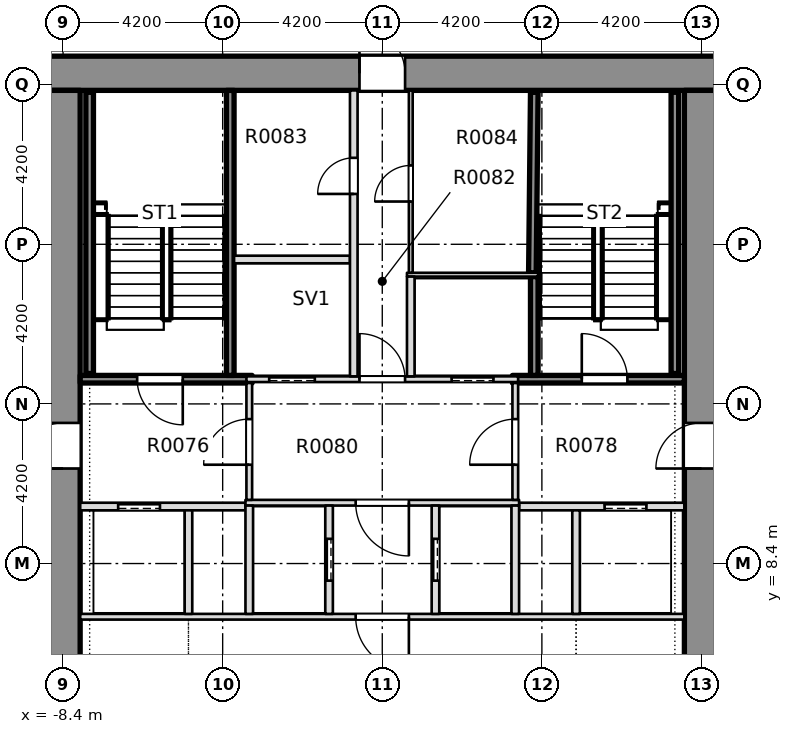
"""IFC4 building model, lengths in metres.
Left out: names, types, materials, properties, quantities, classifications, styles, units other than length and angle.
Written with IfcOpenShell. Run it as: python <this file> out.ifc"""

import sys

from ifc_helpers import new_model, si_unit, direction, frame, frame_2d, origin, place, context, subcontext, project, spatial, rectangle, extrude, element, fill, save


model = new_model("IFC4")
c1 = context("Model", 3, precision=1e-05, world=origin(), true_north=direction((0.0, 1.0)))
c2 = subcontext(c1, "Body", "Model", "MODEL_VIEW")
j1 = project(units=[si_unit("LENGTHUNIT", "METRE"), si_unit("PLANEANGLEUNIT", "RADIAN")], contexts=[c1])
p1 = place(None, origin())
s1 = spatial("IfcSite", under=j1, at=p1, CompositionType="ELEMENT")
p2 = place(p1, origin())
s2 = spatial("IfcBuilding", under=s1, at=p2, CompositionType="ELEMENT")
p3 = place(p2, origin())
s3 = spatial("IfcBuildingStorey", under=s2, at=p3, CompositionType="ELEMENT", Elevation=0.0)
p4 = place(p3, frame((-11.7, 21.3, -0.45), z_axis=(0.0, 0.0, 1.0), x_axis=(1.0, 0.0, 0.0)))
e1 = element("IfcWall", 1, at=p4, inside=s3, PredefinedType="SOLIDWALL", context=c2, shape_type="SweptSolid", body=[
    extrude(rectangle(XDim=23.4, YDim=0.9, at=frame_2d((11.7, 0.0))), origin(), (0.0, 0.0, 1.0), 7.55),
])
p5 = place(p4, frame((11.1, 0.0, 0.45)))
e2 = element("IfcOpeningElement", 2, at=p5, cuts=e1, PredefinedType="OPENING", context=c2, shape_type="SweptSolid", body=[
    extrude(rectangle(XDim=1.2, YDim=2.1, at=frame_2d((0.6, 1.05))), frame((0.0, 0.46, 0.0), z_axis=(0.0, -1.0, 0.0), x_axis=(1.0, 0.0, 0.0)), (0.0, 0.0, 1.0), 0.92),
])
p6 = place(p3, frame((-8.4, -7.5, -0.45), z_axis=(0.0, 0.0, 1.0), x_axis=(0.0, 1.0, 0.0)))
e3 = element("IfcWall", 3, at=p6, inside=s3, PredefinedType="SHEAR", context=c2, shape_type="SweptSolid", body=[
    extrude(rectangle(XDim=28.35, YDim=0.9, at=frame_2d((14.175, 0.0))), origin(), (0.0, 0.0, 1.0), 7.55),
])
p7 = place(p6, frame((18.4, 0.0, 0.45)))
e4 = element("IfcOpeningElement", 4, at=p7, cuts=e3, PredefinedType="OPENING", context=c2, shape_type="SweptSolid", body=[
    extrude(rectangle(XDim=1.2, YDim=2.1, at=frame_2d((0.6, 1.05))), frame((0.0, 0.46, 0.0), z_axis=(0.0, -1.0, 0.0), x_axis=(1.0, 0.0, 0.0)), (0.0, 0.0, 1.0), 0.92),
])
p8 = place(p3, frame((8.4, -7.5, -0.45), z_axis=(0.0, 0.0, 1.0), x_axis=(0.0, 1.0, 0.0)))
e5 = element("IfcWall", 5, at=p8, inside=s3, PredefinedType="SHEAR", context=c2, shape_type="SweptSolid", body=[
    extrude(rectangle(XDim=28.35, YDim=0.9, at=frame_2d((14.175, 0.0))), origin(), (0.0, 0.0, 1.0), 7.55),
])
p9 = place(p8, frame((18.4, 0.0, 0.45)))
e6 = element("IfcOpeningElement", 6, at=p9, cuts=e5, PredefinedType="OPENING", context=c2, shape_type="SweptSolid", body=[
    extrude(rectangle(XDim=1.2, YDim=2.1, at=frame_2d((0.6, 1.05))), frame((0.0, 0.46, 0.0), z_axis=(0.0, -1.0, 0.0), x_axis=(1.0, 0.0, 0.0)), (0.0, 0.0, 1.0), 0.92),
])
p10 = place(p3, frame((-7.949, 7.0, 0.0), z_axis=(0.0, 0.0, 1.0), x_axis=(1.0, 0.0, 0.0)))
e7 = element("IfcWall", 7, at=p10, inside=s3, PredefinedType="PARTITIONING", context=c2, shape_type="SweptSolid", body=[
    extrude(rectangle(XDim=15.898, YDim=0.15, at=frame_2d((7.949, 0.0))), origin(), (0.0, 0.0, 1.0), 7.1),
])
p11 = place(p10, frame((7.249, 0.0, 0.0)))
e8 = element("IfcOpeningElement", 8, at=p11, cuts=e7, PredefinedType="OPENING", context=c2, shape_type="SweptSolid", body=[
    extrude(rectangle(XDim=1.4, YDim=2.1, at=frame_2d((0.7, 1.05))), frame((0.0, 0.085, 0.0), z_axis=(0.0, -1.0, 0.0), x_axis=(1.0, 0.0, 0.0)), (0.0, 0.0, 1.0), 0.17),
])
p12 = place(p3, frame((-7.949, 9.9, 0.0), z_axis=(0.0, 0.0, 1.0), x_axis=(1.0, 0.0, 0.0)))
e9 = element("IfcWall", 9, at=p12, inside=s3, PredefinedType="PARTITIONING", context=c2, shape_type="SweptSolid", body=[
    extrude(rectangle(XDim=4.349, YDim=0.2, at=frame_2d((2.174, 0.0))), origin(), (0.0, 0.0, 1.0), 7.1),
])
p13 = place(p12, frame((0.999, 0.0, 0.0)))
e10 = element("IfcOpeningElement", 10, at=p13, cuts=e9, PredefinedType="OPENING", context=c2, shape_type="SweptSolid", body=[
    extrude(rectangle(XDim=1.1, YDim=2.1, at=frame_2d((0.55, 1.05))), frame((0.0, 0.11, 0.0), z_axis=(0.0, -1.0, 0.0), x_axis=(1.0, 0.0, 0.0)), (0.0, 0.0, 1.0), 0.22),
])
p14 = place(p3, frame((3.6, 9.9, 0.0), z_axis=(0.0, 0.0, 1.0), x_axis=(1.0, 0.0, 0.0)))
e11 = element("IfcWall", 11, at=p14, inside=s3, PredefinedType="PARTITIONING", context=c2, shape_type="SweptSolid", body=[
    extrude(rectangle(XDim=4.349, YDim=0.2, at=frame_2d((2.174, 0.0))), origin(), (0.0, 0.0, 1.0), 7.1),
])
p15 = place(p14, frame((2.25, 0.0, 0.0)))
e12 = element("IfcOpeningElement", 12, at=p15, cuts=e11, PredefinedType="OPENING", context=c2, shape_type="SweptSolid", body=[
    extrude(rectangle(XDim=1.1, YDim=2.1, at=frame_2d((0.55, 1.05))), frame((0.0, 0.11, 0.0), z_axis=(0.0, -1.0, 0.0), x_axis=(1.0, 0.0, 0.0)), (0.0, 0.0, 1.0), 0.22),
])
p16 = place(p3, frame((-3.6, 10.0, 0.0), z_axis=(0.0, 0.0, 1.0), x_axis=(1.0, 0.0, 0.0)))
e13 = element("IfcWall", 13, at=p16, inside=s3, PredefinedType="PARTITIONING", context=c2, shape_type="SweptSolid", body=[
    extrude(rectangle(XDim=7.2, YDim=0.15, at=frame_2d((3.6, 0.0))), origin(), (0.0, 0.0, 1.0), 7.1),
])
p17 = place(p16, frame((2.9, 0.0, 0.0)))
e14 = element("IfcOpeningElement", 14, at=p17, cuts=e13, PredefinedType="OPENING", context=c2, shape_type="SweptSolid", body=[
    extrude(rectangle(XDim=1.4, YDim=2.1, at=frame_2d((0.7, 1.05))), frame((0.0, 0.085, 0.0), z_axis=(0.0, -1.0, 0.0), x_axis=(1.0, 0.0, 0.0)), (0.0, 0.0, 1.0), 0.17),
])
p18 = place(p3, frame((-7.949, 13.25, 0.0), z_axis=(0.0, 0.0, 1.0), x_axis=(1.0, 0.0, 0.0)))
e15 = element("IfcWall", 15, at=p18, inside=s3, PredefinedType="SOLIDWALL", context=c2, shape_type="SweptSolid", body=[
    extrude(rectangle(XDim=4.524, YDim=0.2, at=frame_2d((2.262, 0.0))), origin(), (0.0, 0.0, 1.0), 7.1),
])
p19 = place(p18, frame((1.499, 0.0, 0.0)))
e16 = element("IfcOpeningElement", 16, at=p19, cuts=e15, PredefinedType="OPENING", context=c2, shape_type="SweptSolid", body=[
    extrude(rectangle(XDim=1.2, YDim=2.1, at=frame_2d((0.6, 1.05))), frame((0.0, 0.11, 0.0), z_axis=(0.0, -1.0, 0.0), x_axis=(1.0, 0.0, 0.0)), (0.0, 0.0, 1.0), 0.22),
])
p20 = place(p3, frame((-3.575, 13.25, 0.0), z_axis=(0.0, 0.0, 1.0), x_axis=(1.0, 0.0, 0.0)))
e17 = element("IfcWall", 17, at=p20, inside=s3, PredefinedType="PARTITIONING", context=c2, shape_type="SweptSolid", body=[
    extrude(rectangle(XDim=7.15, YDim=0.15, at=frame_2d((3.575, 0.0))), origin(), (0.0, 0.0, 1.0), 7.1),
])
p21 = place(p20, frame((0.6, 0.0, 0.0)))
e18 = element("IfcOpeningElement", 18, at=p21, cuts=e17, PredefinedType="OPENING", context=c2, shape_type="SweptSolid", body=[
    extrude(rectangle(XDim=1.2, YDim=2.1, at=frame_2d((0.6, 1.05))), frame((0.0, 0.085, 0.0), z_axis=(0.0, -1.0, 0.0), x_axis=(1.0, 0.0, 0.0)), (0.0, 0.0, 1.0), 0.17),
])
p22 = place(p20, frame((5.4, 0.0, 0.0)))
e19 = element("IfcOpeningElement", 19, at=p22, cuts=e17, PredefinedType="OPENING", context=c2, shape_type="SweptSolid", body=[
    extrude(rectangle(XDim=1.1, YDim=2.1, at=frame_2d((0.55, 1.05))), frame((0.0, 0.085, 0.0), z_axis=(0.0, -1.0, 0.0), x_axis=(1.0, 0.0, 0.0)), (0.0, 0.0, 1.0), 0.17),
])
p23 = place(p20, frame((2.975, 0.0, 0.0)))
e20 = element("IfcOpeningElement", 20, at=p23, cuts=e17, PredefinedType="OPENING", context=c2, shape_type="SweptSolid", body=[
    extrude(rectangle(XDim=1.2, YDim=2.1, at=frame_2d((0.6, 1.05))), frame((0.0, 0.085, 0.0), z_axis=(0.0, -1.0, 0.0), x_axis=(1.0, 0.0, 0.0)), (0.0, 0.0, 1.0), 0.17),
])
p24 = place(p3, frame((3.425, 13.25, 0.0), z_axis=(0.0, 0.0, 1.0), x_axis=(1.0, 0.0, 0.0)))
e21 = element("IfcWall", 21, at=p24, inside=s3, PredefinedType="SOLIDWALL", context=c2, shape_type="SweptSolid", body=[
    extrude(rectangle(XDim=4.524, YDim=0.2, at=frame_2d((2.262, 0.0))), origin(), (0.0, 0.0, 1.0), 7.1),
])
p25 = place(p24, frame((1.825, 0.0, 0.0)))
e22 = element("IfcOpeningElement", 22, at=p25, cuts=e21, PredefinedType="OPENING", context=c2, shape_type="SweptSolid", body=[
    extrude(rectangle(XDim=1.2, YDim=2.1, at=frame_2d((0.6, 1.05))), frame((0.0, 0.11, 0.0), z_axis=(0.0, -1.0, 0.0), x_axis=(1.0, 0.0, 0.0)), (0.0, 0.0, 1.0), 0.22),
])
p26 = place(p3, frame((0.65, 16.0, 0.0), z_axis=(0.0, 0.0, 1.0), x_axis=(1.0, 0.0, 0.0)))
e23 = element("IfcWall", 23, at=p26, inside=s3, PredefinedType="PARTITIONING", context=c2, shape_type="SweptSolid", body=[
    extrude(rectangle(XDim=3.45, YDim=0.1, at=frame_2d((1.725, 0.0))), origin(), (0.0, 0.0, 1.0), 7.1),
])
p27 = place(p3, frame((-3.9, 16.4, 0.0), z_axis=(0.0, 0.0, 1.0), x_axis=(1.0, 0.0, 0.0)))
e24 = element("IfcWall", 24, at=p27, inside=s3, PredefinedType="PARTITIONING", context=c2, shape_type="SweptSolid", body=[
    extrude(rectangle(XDim=3.05, YDim=0.2, at=frame_2d((1.525, 0.0))), origin(), (0.0, 0.0, 1.0), 7.1),
])
p28 = place(p3, frame((-5.1, 7.075, 0.0), z_axis=(0.0, 0.0, 1.0), x_axis=(0.0, 1.0, 0.0)))
e25 = element("IfcWall", 25, at=p28, inside=s3, PredefinedType="PARTITIONING", context=c2, shape_type="SweptSolid", body=[
    extrude(rectangle(XDim=2.725, YDim=0.2, at=frame_2d((1.363, 0.0))), origin(), (0.0, 0.0, 1.0), 7.1),
])
p29 = place(p3, frame((-4.0, 13.35, 0.0), z_axis=(0.0, 0.0, 1.0), x_axis=(0.0, 1.0, 0.0)))
e26 = element("IfcWall", 26, at=p29, inside=s3, PredefinedType="SOLIDWALL", context=c2, shape_type="SweptSolid", body=[
    extrude(rectangle(XDim=7.499, YDim=0.2, at=frame_2d((3.75, 0.0))), origin(), (0.0, 0.0, 1.0), 7.1),
])
p30 = place(p3, frame((-3.5, 7.075, 0.0), z_axis=(0.0, 0.0, 1.0), x_axis=(0.0, 1.0, 0.0)))
e27 = element("IfcWall", 27, at=p30, inside=s3, PredefinedType="PARTITIONING", context=c2, shape_type="SweptSolid", body=[
    extrude(rectangle(XDim=2.85, YDim=0.2, at=frame_2d((1.425, 0.0))), origin(), (0.0, 0.0, 1.0), 7.1),
])
p31 = place(p3, frame((-3.5, 10.075, 0.0), z_axis=(0.0, 0.0, 1.0), x_axis=(0.0, 1.0, 0.0)))
e28 = element("IfcWall", 28, at=p31, inside=s3, PredefinedType="PARTITIONING", context=c2, shape_type="SweptSolid", body=[
    extrude(rectangle(XDim=3.075, YDim=0.15, at=frame_2d((1.538, 0.0))), origin(), (0.0, 0.0, 1.0), 7.1),
])
p32 = place(p31, frame((0.925, 0.0, 0.0)))
e29 = element("IfcOpeningElement", 29, at=p32, cuts=e28, PredefinedType="OPENING", context=c2, shape_type="SweptSolid", body=[
    extrude(rectangle(XDim=1.2, YDim=2.1, at=frame_2d((0.6, 1.05))), frame((0.0, 0.085, 0.0), z_axis=(0.0, -1.0, 0.0), x_axis=(1.0, 0.0, 0.0)), (0.0, 0.0, 1.0), 0.17),
])
p33 = place(p3, frame((-1.4, 7.075, 0.0), z_axis=(0.0, 0.0, 1.0), x_axis=(0.0, 1.0, 0.0)))
e30 = element("IfcWall", 30, at=p33, inside=s3, PredefinedType="PARTITIONING", context=c2, shape_type="SweptSolid", body=[
    extrude(rectangle(XDim=2.85, YDim=0.2, at=frame_2d((1.425, 0.0))), origin(), (0.0, 0.0, 1.0), 7.1),
])
p34 = place(p33, frame((0.875, 0.0, 0.0)))
e31 = element("IfcOpeningElement", 31, at=p34, cuts=e30, PredefinedType="OPENING", context=c2, shape_type="SweptSolid", body=[
    extrude(rectangle(XDim=1.1, YDim=2.1, at=frame_2d((0.55, 1.05))), frame((0.0, 0.11, 0.0), z_axis=(0.0, -1.0, 0.0), x_axis=(1.0, 0.0, 0.0)), (0.0, 0.0, 1.0), 0.22),
])
p35 = place(p3, frame((-0.75, 13.325, 0.0), z_axis=(0.0, 0.0, 1.0), x_axis=(0.0, 1.0, 0.0)))
e32 = element("IfcWall", 32, at=p35, inside=s3, PredefinedType="PARTITIONING", context=c2, shape_type="SweptSolid", body=[
    extrude(rectangle(XDim=7.524, YDim=0.2, at=frame_2d((3.762, 0.0))), origin(), (0.0, 0.0, 1.0), 7.1),
])
p36 = place(p35, frame((4.8, 0.0, 0.0)))
e33 = element("IfcOpeningElement", 33, at=p36, cuts=e32, PredefinedType="OPENING", context=c2, shape_type="SweptSolid", body=[
    extrude(rectangle(XDim=0.95, YDim=2.1, at=frame_2d((0.475, 1.05))), frame((0.0, 0.11, 0.0), z_axis=(0.0, -1.0, 0.0), x_axis=(1.0, 0.0, 0.0)), (0.0, 0.0, 1.0), 0.22),
])
p37 = place(p3, frame((0.75, 13.325, 0.0), z_axis=(0.0, 0.0, 1.0), x_axis=(0.0, 1.0, 0.0)))
e34 = element("IfcWall", 34, at=p37, inside=s3, PredefinedType="PARTITIONING", context=c2, shape_type="SweptSolid", body=[
    extrude(rectangle(XDim=2.625, YDim=0.2, at=frame_2d((1.312, 0.0))), origin(), (0.0, 0.0, 1.0), 7.1),
])
p38 = place(p3, frame((0.75, 16.05, 0.0), z_axis=(0.0, 0.0, 1.0), x_axis=(0.0, 1.0, 0.0)))
e35 = element("IfcWall", 35, at=p38, inside=s3, PredefinedType="PARTITIONING", context=c2, shape_type="SweptSolid", body=[
    extrude(rectangle(XDim=4.799, YDim=0.1, at=frame_2d((2.399, 0.0))), origin(), (0.0, 0.0, 1.0), 7.1),
])
p39 = place(p38, frame((1.875, 0.0, 0.0)))
e36 = element("IfcOpeningElement", 36, at=p39, cuts=e35, PredefinedType="OPENING", context=c2, shape_type="SweptSolid", body=[
    extrude(rectangle(XDim=0.95, YDim=2.1, at=frame_2d((0.475, 1.05))), frame((0.0, 0.06, 0.0), z_axis=(0.0, -1.0, 0.0), x_axis=(1.0, 0.0, 0.0)), (0.0, 0.0, 1.0), 0.12),
])
p40 = place(p3, frame((1.4, 7.075, 0.0), z_axis=(0.0, 0.0, 1.0), x_axis=(0.0, 1.0, 0.0)))
e37 = element("IfcWall", 37, at=p40, inside=s3, PredefinedType="PARTITIONING", context=c2, shape_type="SweptSolid", body=[
    extrude(rectangle(XDim=2.85, YDim=0.2, at=frame_2d((1.425, 0.0))), origin(), (0.0, 0.0, 1.0), 7.1),
])
p41 = place(p40, frame((0.875, 0.0, 0.0)))
e38 = element("IfcOpeningElement", 38, at=p41, cuts=e37, PredefinedType="OPENING", context=c2, shape_type="SweptSolid", body=[
    extrude(rectangle(XDim=1.1, YDim=2.1, at=frame_2d((0.55, 1.05))), frame((0.0, 0.11, 0.0), z_axis=(0.0, -1.0, 0.0), x_axis=(1.0, 0.0, 0.0)), (0.0, 0.0, 1.0), 0.22),
])
p42 = place(p3, frame((3.5, 7.075, 0.0), z_axis=(0.0, 0.0, 1.0), x_axis=(0.0, 1.0, 0.0)))
e39 = element("IfcWall", 39, at=p42, inside=s3, PredefinedType="PARTITIONING", context=c2, shape_type="SweptSolid", body=[
    extrude(rectangle(XDim=2.85, YDim=0.2, at=frame_2d((1.425, 0.0))), origin(), (0.0, 0.0, 1.0), 7.1),
])
p43 = place(p3, frame((3.5, 10.075, 0.0), z_axis=(0.0, 0.0, 1.0), x_axis=(0.0, 1.0, 0.0)))
e40 = element("IfcWall", 40, at=p43, inside=s3, PredefinedType="PARTITIONING", context=c2, shape_type="SweptSolid", body=[
    extrude(rectangle(XDim=3.075, YDim=0.15, at=frame_2d((1.538, 0.0))), origin(), (0.0, 0.0, 1.0), 7.1),
])
p44 = place(p43, frame((0.925, 0.0, 0.0)))
e41 = element("IfcOpeningElement", 41, at=p44, cuts=e40, PredefinedType="OPENING", context=c2, shape_type="SweptSolid", body=[
    extrude(rectangle(XDim=1.2, YDim=2.1, at=frame_2d((0.6, 1.05))), frame((0.0, 0.085, 0.0), z_axis=(0.0, -1.0, 0.0), x_axis=(1.0, 0.0, 0.0)), (0.0, 0.0, 1.0), 0.17),
])
p45 = place(p3, frame((4.0, 13.35, 0.0), z_axis=(0.0, 0.0, 1.0), x_axis=(0.0, 1.0, 0.0)))
e42 = element("IfcWall", 42, at=p45, inside=s3, PredefinedType="SOLIDWALL", context=c2, shape_type="SweptSolid", body=[
    extrude(rectangle(XDim=2.6, YDim=0.2, at=frame_2d((1.3, 0.0))), origin(), (0.0, 0.0, 1.0), 7.1),
])
p46 = place(p3, frame((3.95, 16.05, 0.0), z_axis=(0.0, 0.0, 1.0), x_axis=(0.010538176883, 0.999944471872, 0.0)))
e43 = element("IfcWall", 43, at=p46, inside=s3, PredefinedType="SOLIDWALL", context=c2, shape_type="SweptSolid", body=[
    extrude(rectangle(XDim=4.749, YDim=0.2, at=frame_2d((2.375, 0.0))), origin(), (0.0, 0.0, 1.0), 7.1),
])
p47 = place(p3, frame((5.1, 7.075, 0.0), z_axis=(0.0, 0.0, 1.0), x_axis=(0.0, 1.0, 0.0)))
e44 = element("IfcWall", 44, at=p47, inside=s3, PredefinedType="PARTITIONING", context=c2, shape_type="SweptSolid", body=[
    extrude(rectangle(XDim=2.725, YDim=0.2, at=frame_2d((1.363, 0.0))), origin(), (0.0, 0.0, 1.0), 7.1),
])
for number, where, z_axis, x_axis in (
    (45, (-7.7, 13.4, 0.0), (0.0, 0.0, 1.0), (0.0, 1.0, 0.0)),
    (46, (7.7, 13.4, 0.0), (0.0, 0.0, 1.0), (0.0, 1.0, 0.0)),
):
    element("IfcWall", number, at=place(p3, frame(where, z_axis=z_axis, x_axis=x_axis)), inside=s3, PredefinedType="SOLIDWALL", context=c2, shape_type="SweptSolid", body=[
        extrude(rectangle(XDim=7.4, YDim=0.2, at=frame_2d((3.7, 0.0))), origin(), (0.0, 0.0, 1.0), 7.1),
    ])
p48 = place(p19, origin())
e47 = element("IfcDoor", 47, at=p48, inside=s3, OperationType="SINGLE_SWING_LEFT", PredefinedType="DOOR", context=c2, shape_type="SweptSolid", body=[
    extrude(rectangle(XDim=1.2, YDim=2.1, at=frame_2d((0.6, 1.05))), frame((0.0, 0.025, 0.0), z_axis=(0.0, -1.0, 0.0), x_axis=(1.0, 0.0, 0.0)), (0.0, 0.0, 1.0), 0.05),
])
fill(e16, e47)
p49 = place(p13, origin())
e48 = element("IfcDoor", 48, at=p49, inside=s3, OperationType="SLIDING_TO_RIGHT", PredefinedType="DOOR", context=c2, shape_type="SweptSolid", body=[
    extrude(rectangle(XDim=1.1, YDim=2.1, at=frame_2d((0.55, 1.05))), frame((0.0, 0.025, 0.0), z_axis=(0.0, -1.0, 0.0), x_axis=(1.0, 0.0, 0.0)), (0.0, 0.0, 1.0), 0.05),
])
fill(e10, e48)
p50 = place(p25, origin())
e49 = element("IfcDoor", 49, at=p50, inside=s3, OperationType="SINGLE_SWING_RIGHT", PredefinedType="DOOR", context=c2, shape_type="SweptSolid", body=[
    extrude(rectangle(XDim=1.2, YDim=2.1, at=frame_2d((0.6, 1.05))), frame((0.0, 0.025, 0.0), z_axis=(0.0, -1.0, 0.0), x_axis=(1.0, 0.0, 0.0)), (0.0, 0.0, 1.0), 0.05),
])
fill(e22, e49)
p51 = place(p15, origin())
e50 = element("IfcDoor", 50, at=p51, inside=s3, OperationType="SLIDING_TO_LEFT", PredefinedType="DOOR", context=c2, shape_type="SweptSolid", body=[
    extrude(rectangle(XDim=1.1, YDim=2.1, at=frame_2d((0.55, 1.05))), frame((0.0, 0.025, 0.0), z_axis=(0.0, -1.0, 0.0), x_axis=(1.0, 0.0, 0.0)), (0.0, 0.0, 1.0), 0.05),
])
fill(e12, e50)
p52 = place(p11, origin())
e51 = element("IfcDoor", 51, at=p52, inside=s3, OperationType="SINGLE_SWING_RIGHT", PredefinedType="DOOR", context=c2, shape_type="SweptSolid", body=[
    extrude(rectangle(XDim=1.4, YDim=2.1, at=frame_2d((0.7, 1.05))), frame((0.0, 0.025, 0.0), z_axis=(0.0, -1.0, 0.0), x_axis=(1.0, 0.0, 0.0)), (0.0, 0.0, 1.0), 0.05),
])
fill(e8, e51)
p53 = place(p17, origin())
e52 = element("IfcDoor", 52, at=p53, inside=s3, OperationType="SINGLE_SWING_RIGHT", PredefinedType="DOOR", context=c2, shape_type="SweptSolid", body=[
    extrude(rectangle(XDim=1.4, YDim=2.1, at=frame_2d((0.7, 1.05))), frame((0.0, 0.025, 0.0), z_axis=(0.0, -1.0, 0.0), x_axis=(1.0, 0.0, 0.0)), (0.0, 0.0, 1.0), 0.05),
])
fill(e14, e52)
p54 = place(p34, origin())
e53 = element("IfcDoor", 53, at=p54, inside=s3, OperationType="SLIDING_TO_RIGHT", PredefinedType="DOOR", context=c2, shape_type="SweptSolid", body=[
    extrude(rectangle(XDim=1.1, YDim=2.1, at=frame_2d((0.55, 1.05))), frame((0.0, 0.025, 0.0), z_axis=(0.0, -1.0, 0.0), x_axis=(1.0, 0.0, 0.0)), (0.0, 0.0, 1.0), 0.05),
])
fill(e31, e53)
p55 = place(p41, origin())
e54 = element("IfcDoor", 54, at=p55, inside=s3, OperationType="SLIDING_TO_RIGHT", PredefinedType="DOOR", context=c2, shape_type="SweptSolid", body=[
    extrude(rectangle(XDim=1.1, YDim=2.1, at=frame_2d((0.55, 1.05))), frame((0.0, 0.025, 0.0), z_axis=(0.0, -1.0, 0.0), x_axis=(1.0, 0.0, 0.0)), (0.0, 0.0, 1.0), 0.05),
])
fill(e38, e54)
p56 = place(p21, origin())
e55 = element("IfcDoor", 55, at=p56, inside=s3, OperationType="SLIDING_TO_RIGHT", PredefinedType="DOOR", context=c2, shape_type="SweptSolid", body=[
    extrude(rectangle(XDim=1.2, YDim=2.1, at=frame_2d((0.6, 1.05))), frame((0.0, 0.025, 0.0), z_axis=(0.0, -1.0, 0.0), x_axis=(1.0, 0.0, 0.0)), (0.0, 0.0, 1.0), 0.05),
])
fill(e18, e55)
p57 = place(p22, origin())
e56 = element("IfcDoor", 56, at=p57, inside=s3, OperationType="SLIDING_TO_LEFT", PredefinedType="DOOR", context=c2, shape_type="SweptSolid", body=[
    extrude(rectangle(XDim=1.1, YDim=2.1, at=frame_2d((0.55, 1.05))), frame((0.0, 0.025, 0.0), z_axis=(0.0, -1.0, 0.0), x_axis=(1.0, 0.0, 0.0)), (0.0, 0.0, 1.0), 0.05),
])
fill(e19, e56)
p58 = place(p23, origin())
e57 = element("IfcDoor", 57, at=p58, inside=s3, OperationType="SINGLE_SWING_RIGHT", PredefinedType="DOOR", context=c2, shape_type="SweptSolid", body=[
    extrude(rectangle(XDim=1.2, YDim=2.1, at=frame_2d((0.6, 1.05))), frame((0.0, 0.025, 0.0), z_axis=(0.0, -1.0, 0.0), x_axis=(1.0, 0.0, 0.0)), (0.0, 0.0, 1.0), 0.05),
])
fill(e20, e57)
p59 = place(p36, origin())
e58 = element("IfcDoor", 58, at=p59, inside=s3, OperationType="SINGLE_SWING_RIGHT", PredefinedType="DOOR", context=c2, shape_type="SweptSolid", body=[
    extrude(rectangle(XDim=0.95, YDim=2.1, at=frame_2d((0.475, 1.05))), frame((0.0, 0.025, 0.0), z_axis=(0.0, -1.0, 0.0), x_axis=(1.0, 0.0, 0.0)), (0.0, 0.0, 1.0), 0.05),
])
fill(e33, e58)
p60 = place(p39, origin())
e59 = element("IfcDoor", 59, at=p60, inside=s3, OperationType="SINGLE_SWING_LEFT", PredefinedType="DOOR", context=c2, shape_type="SweptSolid", body=[
    extrude(rectangle(XDim=0.95, YDim=2.1, at=frame_2d((0.475, 1.05))), frame((0.0, 0.025, 0.0), z_axis=(0.0, -1.0, 0.0), x_axis=(1.0, 0.0, 0.0)), (0.0, 0.0, 1.0), 0.05),
])
fill(e36, e59)
p61 = place(p32, origin())
e60 = element("IfcDoor", 60, at=p61, inside=s3, OperationType="SINGLE_SWING_RIGHT", PredefinedType="DOOR", context=c2, shape_type="SweptSolid", body=[
    extrude(rectangle(XDim=1.2, YDim=2.1, at=frame_2d((0.6, 1.05))), frame((0.0, 0.025, 0.0), z_axis=(0.0, -1.0, 0.0), x_axis=(1.0, 0.0, 0.0)), (0.0, 0.0, 1.0), 0.05),
])
fill(e29, e60)
p62 = place(p44, origin())
e61 = element("IfcDoor", 61, at=p62, inside=s3, OperationType="SINGLE_SWING_LEFT", PredefinedType="DOOR", context=c2, shape_type="SweptSolid", body=[
    extrude(rectangle(XDim=1.2, YDim=2.1, at=frame_2d((0.6, 1.05))), frame((0.0, 0.025, 0.0), z_axis=(0.0, -1.0, 0.0), x_axis=(1.0, 0.0, 0.0)), (0.0, 0.0, 1.0), 0.05),
])
fill(e41, e61)
p63 = place(p7, origin())
e62 = element("IfcDoor", 62, at=p63, inside=s3, OperationType="SINGLE_SWING_LEFT", PredefinedType="DOOR", context=c2, shape_type="SweptSolid", body=[
    extrude(rectangle(XDim=1.2, YDim=2.1, at=frame_2d((0.6, 1.05))), frame((0.0, 0.025, 0.0), z_axis=(0.0, -1.0, 0.0), x_axis=(1.0, 0.0, 0.0)), (0.0, 0.0, 1.0), 0.05),
])
fill(e4, e62)
p64 = place(p9, origin())
e63 = element("IfcDoor", 63, at=p64, inside=s3, OperationType="SINGLE_SWING_LEFT", PredefinedType="DOOR", context=c2, shape_type="SweptSolid", body=[
    extrude(rectangle(XDim=1.2, YDim=2.1, at=frame_2d((0.6, 1.05))), frame((0.0, 0.025, 0.0), z_axis=(0.0, -1.0, 0.0), x_axis=(1.0, 0.0, 0.0)), (0.0, 0.0, 1.0), 0.05),
])
fill(e6, e63)
p65 = place(p5, origin())
e64 = element("IfcDoor", 64, at=p65, inside=s3, OperationType="SINGLE_SWING_LEFT", PredefinedType="DOOR", context=c2, shape_type="SweptSolid", body=[
    extrude(rectangle(XDim=1.2, YDim=2.1, at=frame_2d((0.6, 1.05))), frame((0.0, 0.025, 0.0), z_axis=(0.0, -1.0, 0.0), x_axis=(1.0, 0.0, 0.0)), (0.0, 0.0, 1.0), 0.05),
])
fill(e2, e64)
save(model, sys.argv[1])
